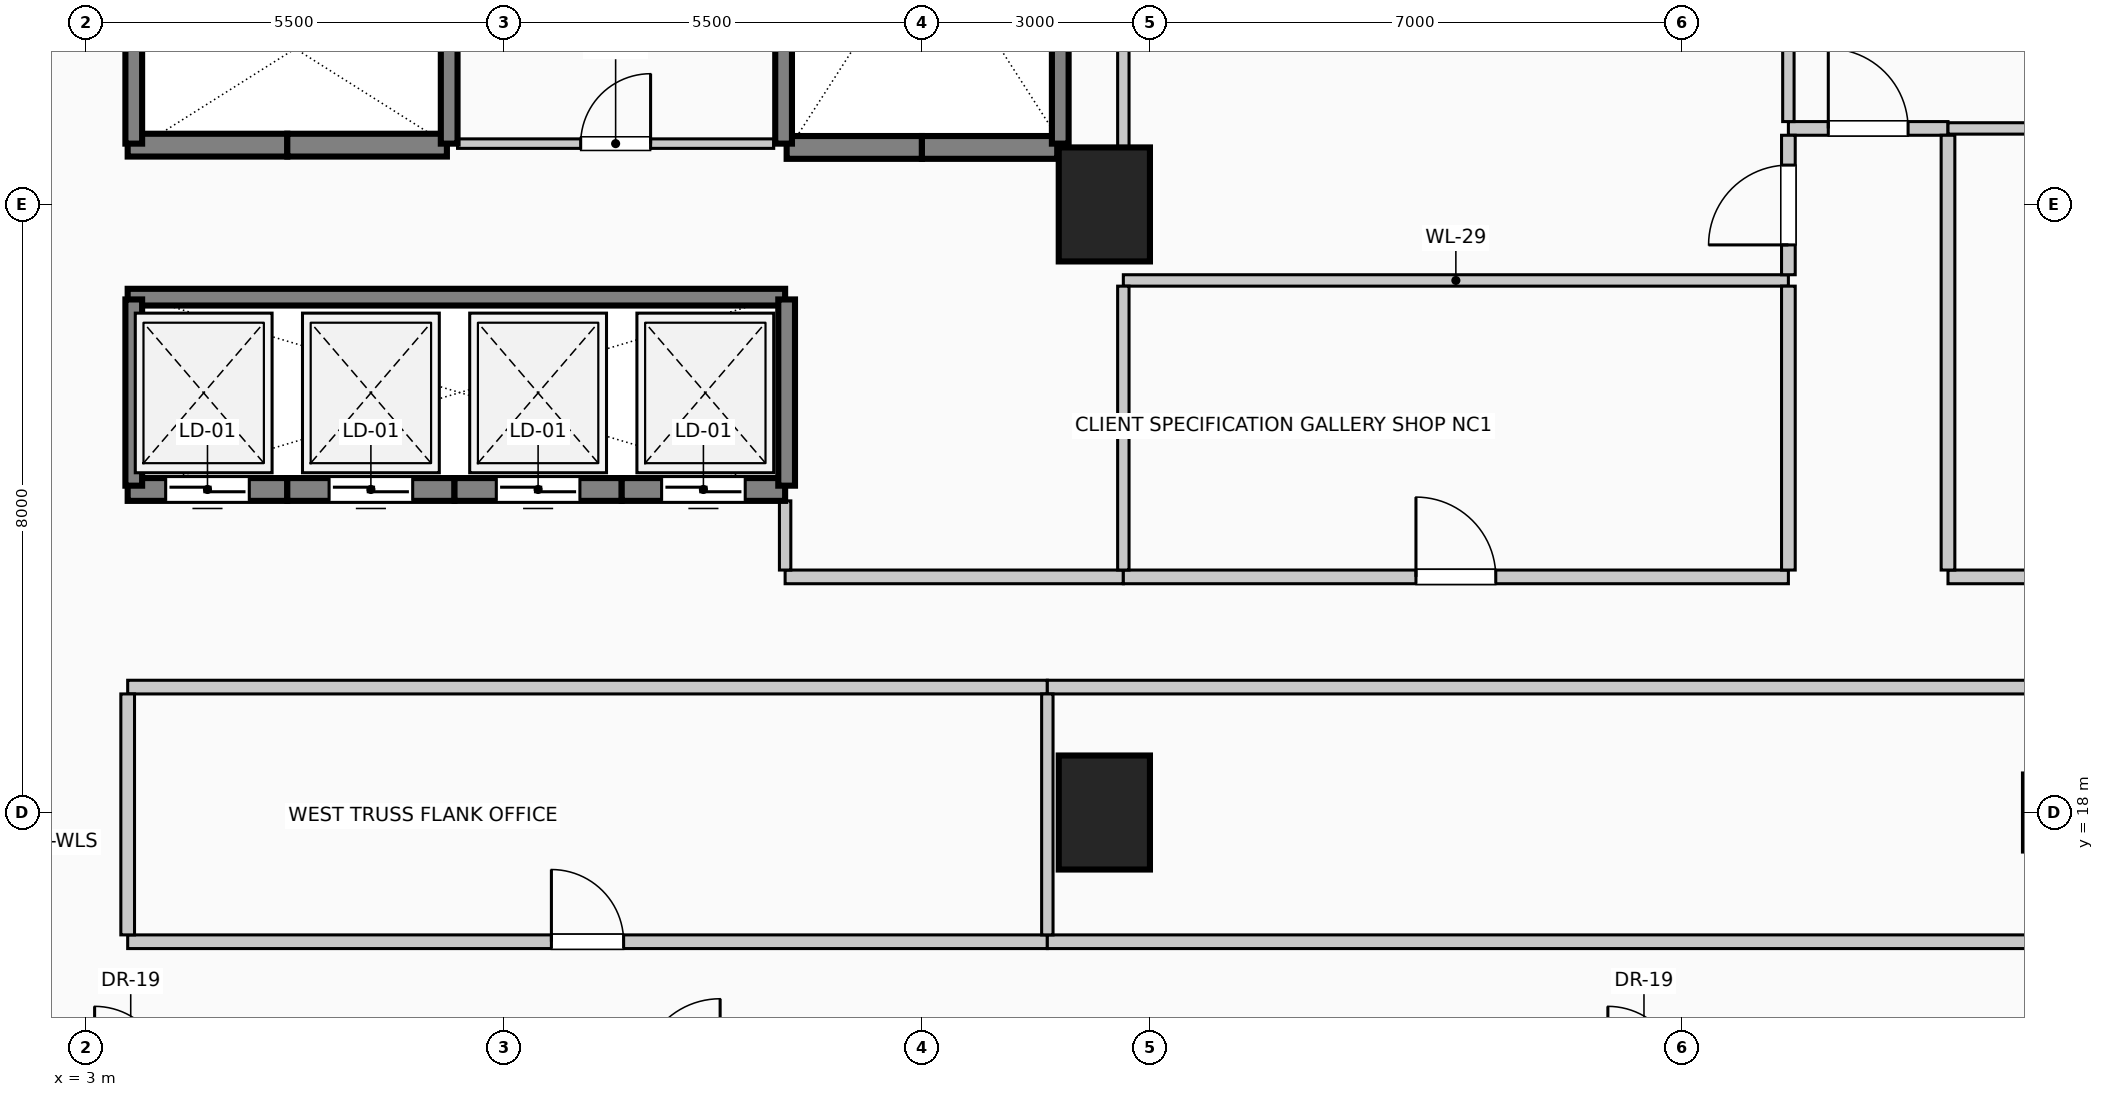
"""IFC4 building model, lengths in metres.
Left out: names, types, materials, properties, quantities, classifications, styles, units other than length and angle.
Written with IfcOpenShell. Run it as: python <this file> out.ifc"""

import sys

from ifc_helpers import new_model, si_unit, direction, frame, frame_2d, origin, origin_2d, place, context, subcontext, project, spatial, rectangle, extrude, element, fill, save


model = new_model("IFC4")
c1 = context("Model", 3, precision=1e-05, world=origin(), true_north=direction((0.0, 1.0)))
c2 = subcontext(c1, "Body", "Model", "MODEL_VIEW")
j1 = project(units=[si_unit("LENGTHUNIT", "METRE"), si_unit("PLANEANGLEUNIT", "RADIAN")], contexts=[c1])
p1 = place(None, origin())
s1 = spatial("IfcSite", under=j1, at=p1, CompositionType="ELEMENT")
p2 = place(p1, origin())
s2 = spatial("IfcBuilding", under=s1, at=p2, CompositionType="ELEMENT")
p3 = place(p2, frame((0.0, 0.0, 62.6)))
s3 = spatial("IfcBuildingStorey", under=s2, at=p3, CompositionType="ELEMENT", Elevation=62.6)
for number, where, z_axis, x_axis in (
    (1, (16.4, 18.0, 0.0), (0.0, 0.0, 1.0), (1.0, 0.0, 0.0)),
    (2, (16.4, 26.0, 0.0), (0.0, 0.0, 1.0), (1.0, 0.0, 0.0)),
):
    element("IfcColumn", number, at=place(p3, frame(where, z_axis=z_axis, x_axis=x_axis)), inside=s3, PredefinedType="COLUMN", context=c2, shape_type="SweptSolid", body=[
        extrude(rectangle(XDim=1.2, YDim=1.5, at=origin_2d()), origin(), (0.0, 0.0, 1.0), 4.0),
    ])
p4 = place(p3, frame((5.65, 22.25, 0.0), z_axis=(0.0, 0.0, 1.0), x_axis=(-1.0, 0.0, 0.0)))
e3 = element("IfcWall", 3, at=p4, inside=s3, PredefinedType="SOLIDWALL", context=c2, shape_type="SweptSolid", body=[
    extrude(rectangle(XDim=2.1, YDim=0.3, at=frame_2d((1.05, 0.0))), origin(), (0.0, 0.0, 1.0), 4.0),
])
p5 = place(p4, frame((0.5, 0.0, 0.0)))
e4 = element("IfcOpeningElement", 4, at=p5, cuts=e3, PredefinedType="OPENING", context=c2, shape_type="SweptSolid", body=[
    extrude(rectangle(XDim=1.1, YDim=2.2, at=frame_2d((0.55, 1.1))), frame((0.0, 0.16, 0.0), z_axis=(0.0, -1.0, 0.0), x_axis=(1.0, 0.0, 0.0)), (0.0, 0.0, 1.0), 0.32),
])
p6 = place(p3, frame((7.85, 22.25, 0.0), z_axis=(0.0, 0.0, 1.0), x_axis=(-1.0, 0.0, 0.0)))
e5 = element("IfcWall", 5, at=p6, inside=s3, PredefinedType="SOLIDWALL", context=c2, shape_type="SweptSolid", body=[
    extrude(rectangle(XDim=2.2, YDim=0.3, at=frame_2d((1.1, 0.0))), origin(), (0.0, 0.0, 1.0), 4.0),
])
p7 = place(p6, frame((0.55, 0.0, 0.0)))
e6 = element("IfcOpeningElement", 6, at=p7, cuts=e5, PredefinedType="OPENING", context=c2, shape_type="SweptSolid", body=[
    extrude(rectangle(XDim=1.1, YDim=2.2, at=frame_2d((0.55, 1.1))), frame((0.0, 0.16, 0.0), z_axis=(0.0, -1.0, 0.0), x_axis=(1.0, 0.0, 0.0)), (0.0, 0.0, 1.0), 0.32),
])
p8 = place(p3, frame((10.05, 22.25, 0.0), z_axis=(0.0, 0.0, 1.0), x_axis=(-1.0, 0.0, 0.0)))
e7 = element("IfcWall", 7, at=p8, inside=s3, PredefinedType="SOLIDWALL", context=c2, shape_type="SweptSolid", body=[
    extrude(rectangle(XDim=2.2, YDim=0.3, at=frame_2d((1.1, 0.0))), origin(), (0.0, 0.0, 1.0), 4.0),
])
p9 = place(p8, frame((0.55, 0.0, 0.0)))
e8 = element("IfcOpeningElement", 8, at=p9, cuts=e7, PredefinedType="OPENING", context=c2, shape_type="SweptSolid", body=[
    extrude(rectangle(XDim=1.1, YDim=2.2, at=frame_2d((0.55, 1.1))), frame((0.0, 0.16, 0.0), z_axis=(0.0, -1.0, 0.0), x_axis=(1.0, 0.0, 0.0)), (0.0, 0.0, 1.0), 0.32),
])
p10 = place(p3, frame((12.2, 22.25, 0.0), z_axis=(0.0, 0.0, 1.0), x_axis=(-1.0, 0.0, 0.0)))
e9 = element("IfcWall", 9, at=p10, inside=s3, PredefinedType="SOLIDWALL", context=c2, shape_type="SweptSolid", body=[
    extrude(rectangle(XDim=2.15, YDim=0.3, at=frame_2d((1.075, 0.0))), origin(), (0.0, 0.0, 1.0), 4.0),
])
p11 = place(p10, frame((0.525, 0.0, 0.0)))
e10 = element("IfcOpeningElement", 10, at=p11, cuts=e9, PredefinedType="OPENING", context=c2, shape_type="SweptSolid", body=[
    extrude(rectangle(XDim=1.1, YDim=2.2, at=frame_2d((0.55, 1.1))), frame((0.0, 0.16, 0.0), z_axis=(0.0, -1.0, 0.0), x_axis=(1.0, 0.0, 0.0)), (0.0, 0.0, 1.0), 0.32),
])
for number, where, z_axis, x_axis in (
    (11, (14.0, 26.75, 0.0), (0.0, 0.0, 1.0), (-1.0, 0.0, 0.0)),
    (12, (15.78, 26.75, 0.0), (0.0, 0.0, 1.0), (-1.0, 0.0, 0.0)),
):
    element("IfcWall", number, at=place(p3, frame(where, z_axis=z_axis, x_axis=x_axis)), inside=s3, PredefinedType="SOLIDWALL", context=c2, shape_type="SweptSolid", body=[
        extrude(rectangle(XDim=1.78, YDim=0.3, at=frame_2d((0.89, 0.0))), origin(), (0.0, 0.0, 1.0), 4.0),
    ])
p12 = place(p3, frame((5.65, 26.78, 0.0), z_axis=(0.0, 0.0, 1.0), x_axis=(-1.0, 0.0, 0.0)))
e13 = element("IfcWall", 13, at=p12, inside=s3, PredefinedType="SOLIDWALL", context=c2, shape_type="SweptSolid", body=[
    extrude(rectangle(XDim=2.1, YDim=0.3, at=frame_2d((1.05, 0.0))), origin(), (0.0, 0.0, 1.0), 4.0),
])
p13 = place(p3, frame((7.75, 26.78, 0.0), z_axis=(0.0, 0.0, 1.0), x_axis=(-1.0, 0.0, 0.0)))
e14 = element("IfcWall", 14, at=p13, inside=s3, PredefinedType="SOLIDWALL", context=c2, shape_type="SweptSolid", body=[
    extrude(rectangle(XDim=2.1, YDim=0.3, at=frame_2d((1.05, 0.0))), origin(), (0.0, 0.0, 1.0), 4.0),
])
p14 = place(p3, frame((3.63, 26.8, 0.0), z_axis=(0.0, 0.0, 1.0), x_axis=(0.0, 1.0, 0.0)))
e15 = element("IfcWall", 15, at=p14, inside=s3, PredefinedType="SOLIDWALL", context=c2, shape_type="SweptSolid", body=[
    extrude(rectangle(XDim=5.55, YDim=0.22, at=frame_2d((2.775, 0.0))), origin(), (0.0, 0.0, 1.0), 4.0),
])
p15 = place(p3, frame((7.78, 26.8, 0.0), z_axis=(0.0, 0.0, 1.0), x_axis=(0.0, 1.0, 0.0)))
e16 = element("IfcWall", 16, at=p15, inside=s3, PredefinedType="SOLIDWALL", context=c2, shape_type="SweptSolid", body=[
    extrude(rectangle(XDim=2.8, YDim=0.22, at=frame_2d((1.4, 0.0))), origin(), (0.0, 0.0, 1.0), 4.0),
])
for number, where, z_axis, x_axis in (
    (17, (12.18, 26.8, 0.0), (0.0, 0.0, 1.0), (0.0, 1.0, 0.0)),
    (18, (15.82, 26.8, 0.0), (0.0, 0.0, 1.0), (0.0, 1.0, 0.0)),
):
    element("IfcWall", number, at=place(p3, frame(where, z_axis=z_axis, x_axis=x_axis)), inside=s3, PredefinedType="SOLIDWALL", context=c2, shape_type="SweptSolid", body=[
        extrude(rectangle(XDim=5.45, YDim=0.22, at=frame_2d((2.725, 0.0))), origin(), (0.0, 0.0, 1.0), 4.0),
    ])
p16 = place(p3, frame((3.55, 24.78, 0.0), z_axis=(0.0, 0.0, 1.0), x_axis=(1.0, 0.0, 0.0)))
e19 = element("IfcWall", 19, at=p16, inside=s3, PredefinedType="SOLIDWALL", context=c2, shape_type="SweptSolid", body=[
    extrude(rectangle(XDim=8.65, YDim=0.22, at=frame_2d((4.325, 0.0))), origin(), (0.0, 0.0, 1.0), 4.0),
])
for number, where, z_axis, x_axis in (
    (20, (3.63, 22.3, 0.0), (0.0, 0.0, 1.0), (0.0, 1.0, 0.0)),
    (21, (12.22, 22.3, 0.0), (0.0, 0.0, 1.0), (0.0, 1.0, 0.0)),
):
    element("IfcWall", number, at=place(p3, frame(where, z_axis=z_axis, x_axis=x_axis)), inside=s3, PredefinedType="SOLIDWALL", context=c2, shape_type="SweptSolid", body=[
        extrude(rectangle(XDim=2.45, YDim=0.22, at=frame_2d((1.225, 0.0))), origin(), (0.0, 0.0, 1.0), 4.0),
    ])
p17 = place(p3, frame((3.55, 16.3, 0.0), z_axis=(0.0, 0.0, 1.0), x_axis=(1.0, 0.0, 0.0)))
e22 = element("IfcWall", 22, at=p17, inside=s3, PredefinedType="PARTITIONING", context=c2, shape_type="SweptSolid", body=[
    extrude(rectangle(XDim=12.1, YDim=0.18, at=frame_2d((6.05, 0.0))), origin(), (0.0, 0.0, 1.0), 3.7),
])
p18 = place(p17, frame((5.575, 0.0, 0.0)))
e23 = element("IfcOpeningElement", 23, at=p18, cuts=e22, PredefinedType="OPENING", context=c2, shape_type="SweptSolid", body=[
    extrude(rectangle(XDim=0.95, YDim=2.15, at=frame_2d((0.475, 1.075))), frame((0.0, 0.1, 0.0), z_axis=(0.0, -1.0, 0.0), x_axis=(1.0, 0.0, 0.0)), (0.0, 0.0, 1.0), 0.2),
])
p19 = place(p3, frame((15.65, 16.3, 0.0), z_axis=(0.0, 0.0, 1.0), x_axis=(1.0, 0.0, 0.0)))
e24 = element("IfcWall", 24, at=p19, inside=s3, PredefinedType="PARTITIONING", context=c2, shape_type="SweptSolid", body=[
    extrude(rectangle(XDim=26.7, YDim=0.18, at=frame_2d((13.35, 0.0))), origin(), (0.0, 0.0, 1.0), 3.7),
])
p20 = place(p3, frame((3.55, 19.65, 0.0), z_axis=(0.0, 0.0, 1.0), x_axis=(1.0, 0.0, 0.0)))
e25 = element("IfcWall", 25, at=p20, inside=s3, PredefinedType="PARTITIONING", context=c2, shape_type="SweptSolid", body=[
    extrude(rectangle(XDim=12.1, YDim=0.18, at=frame_2d((6.05, 0.0))), origin(), (0.0, 0.0, 1.0), 3.7),
])
p21 = place(p3, frame((15.65, 19.65, 0.0), z_axis=(0.0, 0.0, 1.0), x_axis=(1.0, 0.0, 0.0)))
e26 = element("IfcWall", 26, at=p21, inside=s3, PredefinedType="PARTITIONING", context=c2, shape_type="SweptSolid", body=[
    extrude(rectangle(XDim=26.7, YDim=0.18, at=frame_2d((13.35, 0.0))), origin(), (0.0, 0.0, 1.0), 3.7),
])
p22 = place(p3, frame((12.2, 21.1, 0.0), z_axis=(0.0, 0.0, 1.0), x_axis=(1.0, 0.0, 0.0)))
e27 = element("IfcWall", 27, at=p22, inside=s3, PredefinedType="PARTITIONING", context=c2, shape_type="SweptSolid", body=[
    extrude(rectangle(XDim=4.45, YDim=0.18, at=frame_2d((2.225, 0.0))), origin(), (0.0, 0.0, 1.0), 3.7),
])
p23 = place(p3, frame((16.65, 21.1, 0.0), z_axis=(0.0, 0.0, 1.0), x_axis=(1.0, 0.0, 0.0)))
e28 = element("IfcWall", 28, at=p23, inside=s3, PredefinedType="PARTITIONING", context=c2, shape_type="SweptSolid", body=[
    extrude(rectangle(XDim=8.75, YDim=0.18, at=frame_2d((4.375, 0.0))), origin(), (0.0, 0.0, 1.0), 3.7),
])
p24 = place(p23, frame((3.85, 0.0, 0.0)))
e29 = element("IfcOpeningElement", 29, at=p24, cuts=e28, PredefinedType="OPENING", context=c2, shape_type="SweptSolid", body=[
    extrude(rectangle(XDim=1.05, YDim=2.15, at=frame_2d((0.525, 1.075))), frame((0.0, 0.1, 0.0), z_axis=(0.0, -1.0, 0.0), x_axis=(1.0, 0.0, 0.0)), (0.0, 0.0, 1.0), 0.2),
])
p25 = place(p3, frame((27.5, 21.1, 0.0), z_axis=(0.0, 0.0, 1.0), x_axis=(1.0, 0.0, 0.0)))
e30 = element("IfcWall", 30, at=p25, inside=s3, PredefinedType="PARTITIONING", context=c2, shape_type="SweptSolid", body=[
    extrude(rectangle(XDim=14.05, YDim=0.18, at=frame_2d((7.025, 0.0))), origin(), (0.0, 0.0, 1.0), 3.7),
])
p26 = place(p25, frame((6.55, 0.0, 0.0)))
e31 = element("IfcOpeningElement", 31, at=p26, cuts=e30, PredefinedType="OPENING", context=c2, shape_type="SweptSolid", body=[
    extrude(rectangle(XDim=0.95, YDim=2.15, at=frame_2d((0.475, 1.075))), frame((0.0, 0.1, 0.0), z_axis=(0.0, -1.0, 0.0), x_axis=(1.0, 0.0, 0.0)), (0.0, 0.0, 1.0), 0.2),
])
p27 = place(p3, frame((16.65, 25.0, 0.0), z_axis=(0.0, 0.0, 1.0), x_axis=(1.0, 0.0, 0.0)))
e32 = element("IfcWall", 32, at=p27, inside=s3, PredefinedType="PARTITIONING", context=c2, shape_type="SweptSolid", body=[
    extrude(rectangle(XDim=8.75, YDim=0.15, at=frame_2d((4.375, 0.0))), origin(), (0.0, 0.0, 1.0), 3.7),
])
p28 = place(p3, frame((7.89, 26.8, 0.0), z_axis=(0.0, 0.0, 1.0), x_axis=(1.0, 0.0, 0.0)))
e33 = element("IfcWall", 33, at=p28, inside=s3, PredefinedType="PARTITIONING", context=c2, shape_type="SweptSolid", body=[
    extrude(rectangle(XDim=4.16, YDim=0.125, at=frame_2d((2.08, 0.0))), origin(), (0.0, 0.0, 1.0), 3.7),
])
p29 = place(p28, frame((1.62, 0.0, 0.0)))
e34 = element("IfcOpeningElement", 34, at=p29, cuts=e33, PredefinedType="OPENING", context=c2, shape_type="SweptSolid", body=[
    extrude(rectangle(XDim=0.92, YDim=2.1, at=frame_2d((0.46, 1.05))), frame((0.0, 0.073, 0.0), z_axis=(0.0, -1.0, 0.0), x_axis=(1.0, 0.0, 0.0)), (0.0, 0.0, 1.0), 0.145),
])
p30 = place(p3, frame((25.4, 27.0, 0.0), z_axis=(0.0, 0.0, 1.0), x_axis=(1.0, 0.0, 0.0)))
e35 = element("IfcWall", 35, at=p30, inside=s3, PredefinedType="PARTITIONING", context=c2, shape_type="SweptSolid", body=[
    extrude(rectangle(XDim=2.1, YDim=0.18, at=frame_2d((1.05, 0.0))), origin(), (0.0, 0.0, 1.0), 3.7),
])
p31 = place(p30, frame((0.525, 0.0, 0.0)))
e36 = element("IfcOpeningElement", 36, at=p31, cuts=e35, PredefinedType="OPENING", context=c2, shape_type="SweptSolid", body=[
    extrude(rectangle(XDim=1.05, YDim=2.15, at=frame_2d((0.525, 1.075))), frame((0.0, 0.1, 0.0), z_axis=(0.0, -1.0, 0.0), x_axis=(1.0, 0.0, 0.0)), (0.0, 0.0, 1.0), 0.2),
])
p32 = place(p3, frame((27.5, 27.0, 0.0), z_axis=(0.0, 0.0, 1.0), x_axis=(1.0, 0.0, 0.0)))
e37 = element("IfcWall", 37, at=p32, inside=s3, PredefinedType="PARTITIONING", context=c2, shape_type="SweptSolid", body=[
    extrude(rectangle(XDim=14.05, YDim=0.15, at=frame_2d((7.025, 0.0))), origin(), (0.0, 0.0, 1.0), 3.7),
])
p33 = place(p3, frame((3.55, 16.39, 0.0), z_axis=(0.0, 0.0, 1.0), x_axis=(0.0, 1.0, 0.0)))
e38 = element("IfcWall", 38, at=p33, inside=s3, PredefinedType="PARTITIONING", context=c2, shape_type="SweptSolid", body=[
    extrude(rectangle(XDim=3.17, YDim=0.18, at=frame_2d((1.585, 0.0))), origin(), (0.0, 0.0, 1.0), 3.7),
])
p34 = place(p3, frame((12.2, 21.19, 0.0), z_axis=(0.0, 0.0, 1.0), x_axis=(0.0, 1.0, 0.0)))
e39 = element("IfcWall", 39, at=p34, inside=s3, PredefinedType="PARTITIONING", context=c2, shape_type="SweptSolid", body=[
    extrude(rectangle(XDim=0.91, YDim=0.15, at=frame_2d((0.455, 0.0))), origin(), (0.0, 0.0, 1.0), 3.7),
])
p35 = place(p3, frame((15.65, 16.39, 0.0), z_axis=(0.0, 0.0, 1.0), x_axis=(0.0, 1.0, 0.0)))
e40 = element("IfcWall", 40, at=p35, inside=s3, PredefinedType="PARTITIONING", context=c2, shape_type="SweptSolid", body=[
    extrude(rectangle(XDim=3.17, YDim=0.15, at=frame_2d((1.585, 0.0))), origin(), (0.0, 0.0, 1.0), 3.7),
])
p36 = place(p3, frame((16.65, 21.19, 0.0), z_axis=(0.0, 0.0, 1.0), x_axis=(0.0, 1.0, 0.0)))
e41 = element("IfcWall", 41, at=p36, inside=s3, PredefinedType="PARTITIONING", context=c2, shape_type="SweptSolid", body=[
    extrude(rectangle(XDim=3.735, YDim=0.15, at=frame_2d((1.868, 0.0))), origin(), (0.0, 0.0, 1.0), 2.995),
])
p37 = place(p3, frame((16.65, 26.75, 0.0), z_axis=(0.0, 0.0, 1.0), x_axis=(0.0, 1.0, 0.0)))
e42 = element("IfcWall", 42, at=p37, inside=s3, PredefinedType="PARTITIONING", context=c2, shape_type="SweptSolid", body=[
    extrude(rectangle(XDim=6.75, YDim=0.15, at=frame_2d((3.375, 0.0))), origin(), (0.0, 0.0, 1.0), 2.995),
])
p38 = place(p3, frame((25.4, 21.19, 0.0), z_axis=(0.0, 0.0, 1.0), x_axis=(0.0, 1.0, 0.0)))
e43 = element("IfcWall", 43, at=p38, inside=s3, PredefinedType="PARTITIONING", context=c2, shape_type="SweptSolid", body=[
    extrude(rectangle(XDim=3.735, YDim=0.18, at=frame_2d((1.868, 0.0))), origin(), (0.0, 0.0, 1.0), 3.7),
])
p39 = place(p3, frame((25.4, 25.075, 0.0), z_axis=(0.0, 0.0, 1.0), x_axis=(0.0, 1.0, 0.0)))
e44 = element("IfcWall", 44, at=p39, inside=s3, PredefinedType="PARTITIONING", context=c2, shape_type="SweptSolid", body=[
    extrude(rectangle(XDim=1.835, YDim=0.18, at=frame_2d((0.917, 0.0))), origin(), (0.0, 0.0, 1.0), 3.7),
])
p40 = place(p39, frame((0.393, 0.0, 0.0)))
e45 = element("IfcOpeningElement", 45, at=p40, cuts=e44, PredefinedType="OPENING", context=c2, shape_type="SweptSolid", body=[
    extrude(rectangle(XDim=1.05, YDim=2.15, at=frame_2d((0.525, 1.075))), frame((0.0, 0.1, 0.0), z_axis=(0.0, -1.0, 0.0), x_axis=(1.0, 0.0, 0.0)), (0.0, 0.0, 1.0), 0.2),
])
p41 = place(p3, frame((25.4, 27.09, 0.0), z_axis=(0.0, 0.0, 1.0), x_axis=(0.0, 1.0, 0.0)))
e46 = element("IfcWall", 46, at=p41, inside=s3, PredefinedType="PARTITIONING", context=c2, shape_type="SweptSolid", body=[
    extrude(rectangle(XDim=18.17, YDim=0.15, at=frame_2d((9.085, 0.0))), origin(), (0.0, 0.0, 1.0), 3.7),
])
p42 = place(p3, frame((27.5, 21.19, 0.0), z_axis=(0.0, 0.0, 1.0), x_axis=(0.0, 1.0, 0.0)))
e47 = element("IfcWall", 47, at=p42, inside=s3, PredefinedType="PARTITIONING", context=c2, shape_type="SweptSolid", body=[
    extrude(rectangle(XDim=5.72, YDim=0.18, at=frame_2d((2.86, 0.0))), origin(), (0.0, 0.0, 1.0), 3.7),
])
p43 = place(p5, origin())
e48 = element("IfcDoor", 48, at=p43, inside=s3, OperationType="SLIDING_TO_LEFT", PredefinedType="DOOR", context=c2, shape_type="SweptSolid", body=[
    extrude(rectangle(XDim=1.1, YDim=2.2, at=frame_2d((0.55, 1.1))), frame((0.0, 0.025, 0.0), z_axis=(0.0, -1.0, 0.0), x_axis=(1.0, 0.0, 0.0)), (0.0, 0.0, 1.0), 0.05),
])
fill(e4, e48)
p44 = place(p7, origin())
e49 = element("IfcDoor", 49, at=p44, inside=s3, OperationType="SLIDING_TO_RIGHT", PredefinedType="DOOR", context=c2, shape_type="SweptSolid", body=[
    extrude(rectangle(XDim=1.1, YDim=2.2, at=frame_2d((0.55, 1.1))), frame((0.0, 0.025, 0.0), z_axis=(0.0, -1.0, 0.0), x_axis=(1.0, 0.0, 0.0)), (0.0, 0.0, 1.0), 0.05),
])
fill(e6, e49)
p45 = place(p9, origin())
e50 = element("IfcDoor", 50, at=p45, inside=s3, OperationType="SLIDING_TO_LEFT", PredefinedType="DOOR", context=c2, shape_type="SweptSolid", body=[
    extrude(rectangle(XDim=1.1, YDim=2.2, at=frame_2d((0.55, 1.1))), frame((0.0, 0.025, 0.0), z_axis=(0.0, -1.0, 0.0), x_axis=(1.0, 0.0, 0.0)), (0.0, 0.0, 1.0), 0.05),
])
fill(e8, e50)
p46 = place(p11, origin())
e51 = element("IfcDoor", 51, at=p46, inside=s3, OperationType="SLIDING_TO_RIGHT", PredefinedType="DOOR", context=c2, shape_type="SweptSolid", body=[
    extrude(rectangle(XDim=1.1, YDim=2.2, at=frame_2d((0.55, 1.1))), frame((0.0, 0.025, 0.0), z_axis=(0.0, -1.0, 0.0), x_axis=(1.0, 0.0, 0.0)), (0.0, 0.0, 1.0), 0.05),
])
fill(e10, e51)
p47 = place(p18, origin())
e52 = element("IfcDoor", 52, at=p47, inside=s3, OperationType="SINGLE_SWING_LEFT", PredefinedType="DOOR", context=c2, shape_type="SweptSolid", body=[
    extrude(rectangle(XDim=0.95, YDim=2.15, at=frame_2d((0.475, 1.075))), frame((0.0, 0.025, 0.0), z_axis=(0.0, -1.0, 0.0), x_axis=(1.0, 0.0, 0.0)), (0.0, 0.0, 1.0), 0.05),
])
fill(e23, e52)
p48 = place(p24, origin())
e53 = element("IfcDoor", 53, at=p48, inside=s3, OperationType="SINGLE_SWING_LEFT", PredefinedType="DOOR", context=c2, shape_type="SweptSolid", body=[
    extrude(rectangle(XDim=1.05, YDim=2.15, at=frame_2d((0.525, 1.075))), frame((0.0, 0.025, 0.0), z_axis=(0.0, -1.0, 0.0), x_axis=(1.0, 0.0, 0.0)), (0.0, 0.0, 1.0), 0.05),
])
fill(e29, e53)
p49 = place(p29, origin())
e54 = element("IfcDoor", 54, at=p49, inside=s3, OperationType="SINGLE_SWING_RIGHT", PredefinedType="DOOR", context=c2, shape_type="SweptSolid", body=[
    extrude(rectangle(XDim=0.92, YDim=2.1, at=frame_2d((0.46, 1.05))), frame((0.0, 0.025, 0.0), z_axis=(0.0, -1.0, 0.0), x_axis=(1.0, 0.0, 0.0)), (0.0, 0.0, 1.0), 0.05),
])
fill(e34, e54)
p50 = place(p31, origin())
e55 = element("IfcDoor", 55, at=p50, inside=s3, OperationType="SINGLE_SWING_LEFT", PredefinedType="DOOR", context=c2, shape_type="SweptSolid", body=[
    extrude(rectangle(XDim=1.05, YDim=2.15, at=frame_2d((0.525, 1.075))), frame((0.0, 0.025, 0.0), z_axis=(0.0, -1.0, 0.0), x_axis=(1.0, 0.0, 0.0)), (0.0, 0.0, 1.0), 0.05),
])
fill(e36, e55)
p51 = place(p40, origin())
e56 = element("IfcDoor", 56, at=p51, inside=s3, OperationType="SINGLE_SWING_LEFT", PredefinedType="DOOR", context=c2, shape_type="SweptSolid", body=[
    extrude(rectangle(XDim=1.05, YDim=2.15, at=frame_2d((0.525, 1.075))), frame((0.0, 0.025, 0.0), z_axis=(0.0, -1.0, 0.0), x_axis=(1.0, 0.0, 0.0)), (0.0, 0.0, 1.0), 0.05),
])
fill(e45, e56)
save(model, sys.argv[1])
